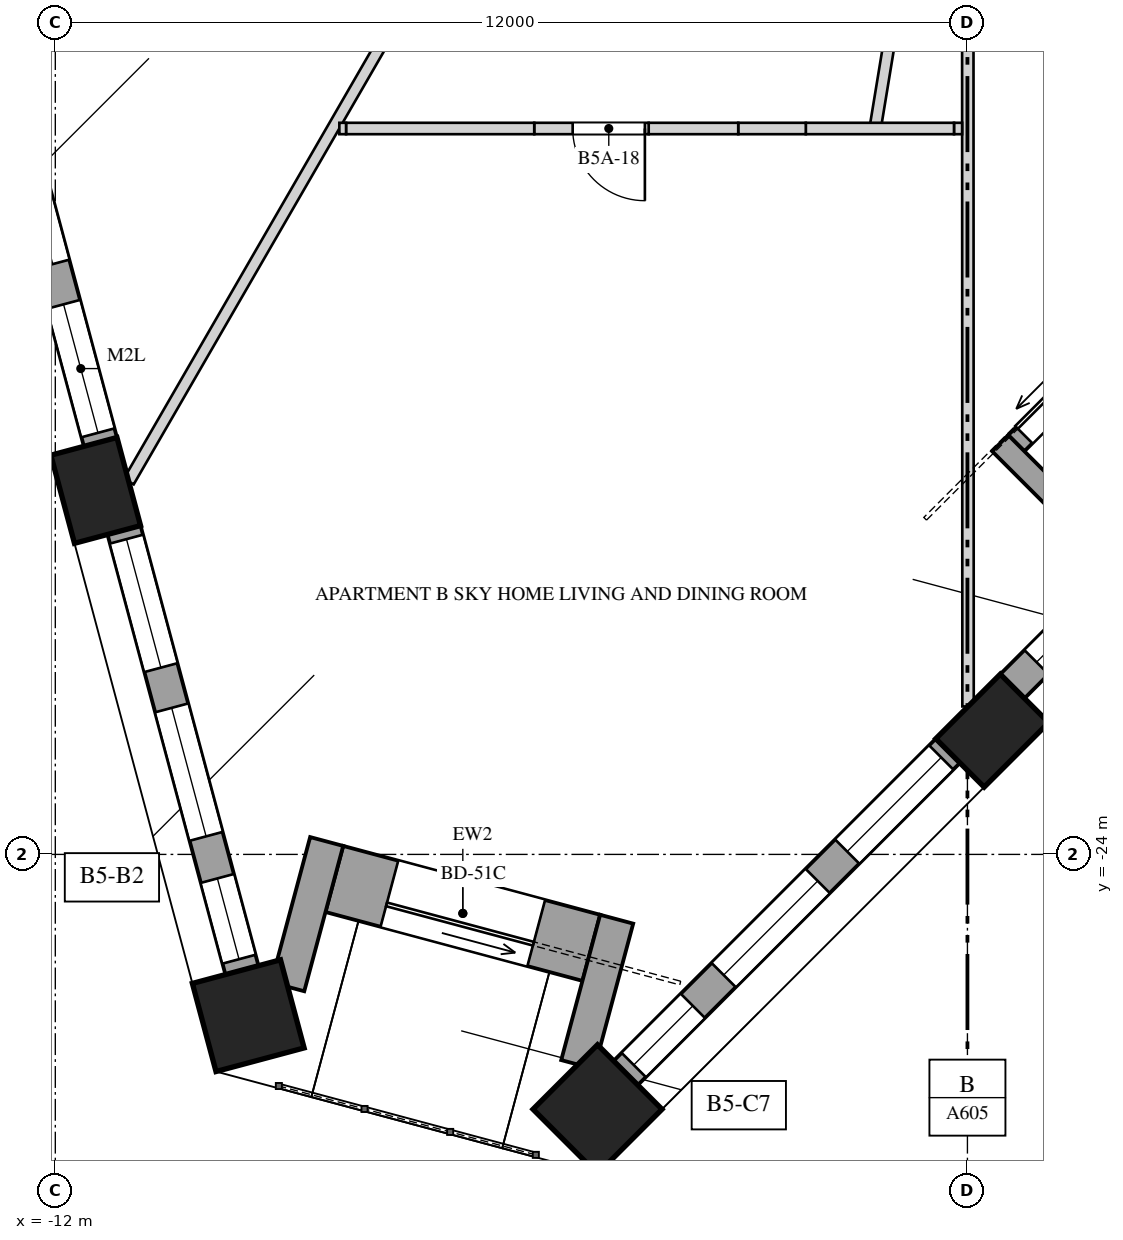
"""IFC4 building model, lengths in metres.
Left out: names, types, materials, properties, quantities, classifications, styles, units other than length and angle.
Written with IfcOpenShell. Run it as: python <this file> out.ifc"""

import sys

from ifc_helpers import new_model, si_unit, direction, frame, frame_2d, origin, origin_2d, place, context, subcontext, project, spatial, polyline, rectangle, outline, extrude, element, fill, save


model = new_model("IFC4")
c1 = context("Model", 3, precision=1e-05, world=origin(), true_north=direction((0.0, 1.0)))
c2 = subcontext(c1, "Body", "Model", "MODEL_VIEW")
j1 = project(units=[si_unit("LENGTHUNIT", "METRE"), si_unit("PLANEANGLEUNIT", "RADIAN")], contexts=[c1])
p1 = place(None, origin())
s1 = spatial("IfcSite", under=j1, at=p1, CompositionType="ELEMENT")
p2 = place(p1, origin())
s2 = spatial("IfcBuilding", under=s1, at=p2, CompositionType="ELEMENT")
p3 = place(p2, frame((0.0, 0.0, 200.0)))
s3 = spatial("IfcBuildingStorey", under=s2, at=p3, CompositionType="ELEMENT", Elevation=200.0)
p4 = place(p3, frame((-11.469, -19.211, -0.35), z_axis=(0.0, 0.0, 1.0), x_axis=(0.258819045103, -0.965925826289, 0.0)))
e1 = element("IfcColumn", 1, at=p4, inside=s3, PredefinedType="COLUMN", context=c2, shape_type="SweptSolid", body=[
    extrude(rectangle(XDim=1.2, YDim=0.9, at=origin_2d()), origin(), (0.0, 0.0, 1.0), 4.35),
])
for number, where, z_axis, x_axis in (
    (2, (-9.462, -26.122, -0.35), (0.0, 0.0, 1.0), (0.259, -0.966, 0.0)),
    (3, (-4.867, -27.353, -0.35), (0.0, 0.0, 1.0), (0.707, 0.707, 0.0)),
):
    element("IfcColumn", number, at=place(p3, frame(where, z_axis=z_axis, x_axis=x_axis)), inside=s3, PredefinedType="COLUMN", context=c2, shape_type="SweptSolid", body=[
        extrude(rectangle(XDim=1.2, YDim=1.2, at=origin_2d()), origin(), (0.0, 0.0, 1.0), 4.35),
    ])
p5 = place(p3, frame((0.326, -22.372, -0.35), z_axis=(0.0, 0.0, 1.0), x_axis=(0.707106781187, 0.707106781187, 0.0)))
e4 = element("IfcColumn", 4, at=p5, inside=s3, PredefinedType="COLUMN", context=c2, shape_type="SweptSolid", body=[
    extrude(rectangle(XDim=1.2, YDim=0.9, at=origin_2d()), origin(), (0.0, 0.0, 1.0), 4.35),
])
p6 = place(p3, frame((-13.113, -12.204, 0.0), z_axis=(0.0, 0.0, 1.0), x_axis=(0.258835402268, -0.965921443251, 0.0)))
e5 = element("IfcWall", 5, at=p6, inside=s3, PredefinedType="SOLIDWALL", context=c2, shape_type="SweptSolid", body=[
    extrude(rectangle(XDim=6.594, YDim=0.45, at=frame_2d((3.297, 0.0))), origin(), (0.0, 0.0, 1.0), 3.3),
])
p7 = place(p6, frame((0.124, 0.0, 0.5)))
e6 = element("IfcOpeningElement", 6, at=p7, cuts=e5, PredefinedType="OPENING", context=c2, shape_type="SweptSolid", body=[
    extrude(rectangle(XDim=1.75, YDim=2.65, at=frame_2d((0.875, 1.325))), frame((0.0, 0.235, 0.0), z_axis=(0.0, -1.0, 0.0), x_axis=(1.0, 0.0, 0.0)), (0.0, 0.0, 1.0), 0.47),
])
p8 = place(p6, frame((2.422, 0.0, 0.5)))
e7 = element("IfcOpeningElement", 7, at=p8, cuts=e5, PredefinedType="OPENING", context=c2, shape_type="SweptSolid", body=[
    extrude(rectangle(XDim=1.75, YDim=2.65, at=frame_2d((0.875, 1.325))), frame((0.0, 0.235, 0.0), z_axis=(0.0, -1.0, 0.0), x_axis=(1.0, 0.0, 0.0)), (0.0, 0.0, 1.0), 0.47),
])
p9 = place(p6, frame((4.72, 0.0, 0.5)))
e8 = element("IfcOpeningElement", 8, at=p9, cuts=e5, PredefinedType="OPENING", context=c2, shape_type="SweptSolid", body=[
    extrude(rectangle(XDim=1.75, YDim=2.0, at=frame_2d((0.875, 1.0))), frame((0.0, 0.235, 0.0), z_axis=(0.0, -1.0, 0.0), x_axis=(1.0, 0.0, 0.0)), (0.0, 0.0, 1.0), 0.47),
])
p10 = place(p3, frame((-11.096, -19.733, 0.0), z_axis=(0.0, 0.0, 1.0), x_axis=(0.258831089404, -0.965922598948, 0.0)))
e9 = element("IfcWall", 9, at=p10, inside=s3, PredefinedType="SOLIDWALL", context=c2, shape_type="SweptSolid", body=[
    extrude(rectangle(XDim=5.994, YDim=0.45, at=frame_2d((2.997, 0.0))), origin(), (0.0, 0.0, 1.0), 3.3),
])
p11 = place(p10, frame((0.124, 0.0, 0.5)))
e10 = element("IfcOpeningElement", 10, at=p11, cuts=e9, PredefinedType="OPENING", context=c2, shape_type="SweptSolid", body=[
    extrude(rectangle(XDim=1.75, YDim=2.65, at=frame_2d((0.875, 1.325))), frame((0.0, 0.235, 0.0), z_axis=(0.0, -1.0, 0.0), x_axis=(1.0, 0.0, 0.0)), (0.0, 0.0, 1.0), 0.47),
])
p12 = place(p10, frame((2.422, 0.0, 0.5)))
e11 = element("IfcOpeningElement", 11, at=p12, cuts=e9, PredefinedType="OPENING", context=c2, shape_type="SweptSolid", body=[
    extrude(rectangle(XDim=1.75, YDim=2.65, at=frame_2d((0.875, 1.325))), frame((0.0, 0.235, 0.0), z_axis=(0.0, -1.0, 0.0), x_axis=(1.0, 0.0, 0.0)), (0.0, 0.0, 1.0), 0.47),
])
p13 = place(p10, frame((4.745, 0.0, 0.5)))
e12 = element("IfcOpeningElement", 12, at=p13, cuts=e9, PredefinedType="OPENING", context=c2, shape_type="SweptSolid", body=[
    extrude(rectangle(XDim=1.1, YDim=2.0, at=frame_2d((0.55, 1.0))), frame((0.0, 0.235, 0.0), z_axis=(0.0, -1.0, 0.0), x_axis=(1.0, 0.0, 0.0)), (0.0, 0.0, 1.0), 0.47),
])
p14 = place(p3, frame((-4.496, -26.875, 0.0), z_axis=(0.0, 0.0, 1.0), x_axis=(0.707106781187, 0.707106781187, 0.0)))
e13 = element("IfcWall", 13, at=p14, inside=s3, PredefinedType="SOLIDWALL", context=c2, shape_type="SweptSolid", body=[
    extrude(rectangle(XDim=5.994, YDim=0.45, at=frame_2d((2.997, 0.0))), origin(), (0.0, 0.0, 1.0), 3.3),
])
p15 = place(p14, frame((0.149, 0.0, 0.5)))
e14 = element("IfcOpeningElement", 14, at=p15, cuts=e13, PredefinedType="OPENING", context=c2, shape_type="SweptSolid", body=[
    extrude(rectangle(XDim=1.1, YDim=2.0, at=frame_2d((0.55, 1.0))), frame((0.0, 0.235, 0.0), z_axis=(0.0, -1.0, 0.0), x_axis=(1.0, 0.0, 0.0)), (0.0, 0.0, 1.0), 0.47),
])
p16 = place(p14, frame((1.822, 0.0, 0.5)))
e15 = element("IfcOpeningElement", 15, at=p16, cuts=e13, PredefinedType="OPENING", context=c2, shape_type="SweptSolid", body=[
    extrude(rectangle(XDim=1.75, YDim=2.65, at=frame_2d((0.875, 1.325))), frame((0.0, 0.235, 0.0), z_axis=(0.0, -1.0, 0.0), x_axis=(1.0, 0.0, 0.0)), (0.0, 0.0, 1.0), 0.47),
])
p17 = place(p14, frame((4.12, 0.0, 0.5)))
e16 = element("IfcOpeningElement", 16, at=p17, cuts=e13, PredefinedType="OPENING", context=c2, shape_type="SweptSolid", body=[
    extrude(rectangle(XDim=1.75, YDim=2.65, at=frame_2d((0.875, 1.325))), frame((0.0, 0.235, 0.0), z_axis=(0.0, -1.0, 0.0), x_axis=(1.0, 0.0, 0.0)), (0.0, 0.0, 1.0), 0.47),
])
p18 = place(p3, frame((0.592, -21.788, 0.0), z_axis=(0.0, 0.0, 1.0), x_axis=(0.707106781187, 0.707106781187, 0.0)))
e17 = element("IfcWall", 17, at=p18, inside=s3, PredefinedType="SOLIDWALL", context=c2, shape_type="SweptSolid", body=[
    extrude(rectangle(XDim=1.998, YDim=0.45, at=frame_2d((0.999, 0.0))), origin(), (0.0, 0.0, 1.0), 3.3),
])
p19 = place(p18, frame((0.449, 0.0, 0.5)))
e18 = element("IfcOpeningElement", 18, at=p19, cuts=e17, PredefinedType="OPENING", context=c2, shape_type="SweptSolid", body=[
    extrude(rectangle(XDim=1.1, YDim=2.65, at=frame_2d((0.55, 1.325))), frame((0.0, 0.235, 0.0), z_axis=(0.0, -1.0, 0.0), x_axis=(1.0, 0.0, 0.0)), (0.0, 0.0, 1.0), 0.47),
])
p20 = place(p3, frame((0.643, -18.59, 0.0), z_axis=(0.0, 0.0, 1.0), x_axis=(0.707106781187, 0.707106781187, 0.0)))
e19 = element("IfcWall", 19, at=p20, inside=s3, PredefinedType="SOLIDWALL", context=c2, shape_type="SweptSolid", body=[
    extrude(rectangle(XDim=1.998, YDim=0.3, at=frame_2d((0.999, 0.0))), origin(), (0.0, 0.0, 1.0), 3.3),
])
p21 = place(p20, frame((0.149, 0.0, 0.0)))
e20 = element("IfcOpeningElement", 20, at=p21, cuts=e19, PredefinedType="OPENING", context=c2, shape_type="SweptSolid", body=[
    extrude(rectangle(XDim=1.7, YDim=2.45, at=frame_2d((0.85, 1.225))), frame((0.0, 0.16, 0.0), z_axis=(0.0, -1.0, 0.0), x_axis=(1.0, 0.0, 0.0)), (0.0, 0.0, 1.0), 0.32),
])
p22 = place(p3, frame((2.588, -20.747, 0.0), z_axis=(0.0, 0.0, 1.0), x_axis=(-0.707066755897, 0.707146804211, 0.0)))
e21 = element("IfcWall", 21, at=p22, inside=s3, PredefinedType="SOLIDWALL", context=c2, shape_type="SweptSolid", body=[
    extrude(rectangle(XDim=3.05, YDim=0.3, at=frame_2d((1.525, 0.0))), origin(), (0.0, 0.0, 1.0), 3.3),
])
p23 = place(p3, frame((-4.948, -25.229, 0.0), z_axis=(0.0, 0.0, 1.0), x_axis=(-0.965918160473, 0.258847652622, 0.0)))
e22 = element("IfcWall", 22, at=p23, inside=s3, PredefinedType="SOLIDWALL", context=c2, shape_type="SweptSolid", body=[
    extrude(rectangle(XDim=3.5, YDim=0.9, at=frame_2d((1.75, 0.0))), origin(), (0.0, 0.0, 1.0), 3.3),
])
p24 = place(p23, frame((0.75, 0.0, 0.0)))
e23 = element("IfcOpeningElement", 23, at=p24, cuts=e22, PredefinedType="OPENING", context=c2, shape_type="SweptSolid", body=[
    extrude(rectangle(XDim=2.0, YDim=2.4, at=frame_2d((1.0, 1.2))), frame((0.0, 0.46, 0.0), z_axis=(0.0, -1.0, 0.0), x_axis=(1.0, 0.0, 0.0)), (0.0, 0.0, 1.0), 0.92),
])
p25 = place(p3, frame((-5.127, -26.764, 0.0), z_axis=(0.0, 0.0, 1.0), x_axis=(0.258814190615, 0.965927127032, 0.0)))
e24 = element("IfcWall", 24, at=p25, inside=s3, PredefinedType="SOLIDWALL", context=c2, shape_type="SweptSolid", body=[
    extrude(rectangle(XDim=1.979, YDim=0.45, at=frame_2d((0.99, 0.0))), origin(), (0.0, 0.0, 1.0), 2.55),
])
p26 = place(p3, frame((-8.942, -25.742, 0.0), z_axis=(0.0, 0.0, 1.0), x_axis=(0.258783354109, 0.965935388955, 0.0)))
e25 = element("IfcWall", 25, at=p26, inside=s3, PredefinedType="SOLIDWALL", context=c2, shape_type="SweptSolid", body=[
    extrude(rectangle(XDim=1.979, YDim=0.45, at=frame_2d((0.99, 0.0))), origin(), (0.0, 0.0, 1.0), 2.55),
])
p27 = place(p3, frame((-11.034, -19.095, 0.0), z_axis=(0.0, 0.0, 1.0), x_axis=(0.500337694151, 0.86583034817, 0.0)))
e26 = element("IfcWall", 26, at=p27, inside=s3, PredefinedType="PARTITIONING", context=c2, shape_type="SweptSolid", body=[
    extrude(rectangle(XDim=9.205, YDim=0.15, at=frame_2d((4.603, 0.0))), origin(), (0.0, 0.0, 1.0), 2.75),
])
p28 = place(p3, frame((-0.655, -11.052, 0.0), z_axis=(0.0, 0.0, 1.0), x_axis=(-0.162305002106, -0.986740637803, 0.0)))
e27 = element("IfcWall", 27, at=p28, inside=s3, PredefinedType="PARTITIONING", context=c2, shape_type="SweptSolid", body=[
    extrude(rectangle(XDim=3.442, YDim=0.15, at=frame_2d((1.721, 0.0))), origin(), (0.0, 0.0, 1.0), 3.65),
])
p29 = place(p28, frame((1.296, 0.0, 0.0)))
e28 = element("IfcOpeningElement", 28, at=p29, cuts=e27, PredefinedType="OPENING", context=c2, shape_type="SweptSolid", body=[
    extrude(rectangle(XDim=0.85, YDim=2.4, at=frame_2d((0.425, 1.2))), frame((0.0, 0.085, 0.0), z_axis=(0.0, -1.0, 0.0), x_axis=(1.0, 0.0, 0.0)), (0.0, 0.0, 1.0), 0.17),
])
p30 = place(p3, frame((0.004, -11.125, 0.0), z_axis=(0.0, 0.0, 1.0), x_axis=(0.00035743804, -0.999999936119, 0.0)))
e29 = element("IfcWall", 29, at=p30, inside=s3, PredefinedType="PARTITIONING", context=c2, shape_type="SweptSolid", body=[
    extrude(rectangle(XDim=10.928, YDim=0.15, at=frame_2d((5.464, 0.0))), origin(), (0.0, 0.0, 1.0), 2.75),
])
p31 = place(p3, frame((-0.07, -14.45, 0.0), z_axis=(0.0, 0.0, 1.0), x_axis=(-1.0, 0.0, 0.0)))
e30 = element("IfcWall", 30, at=p31, inside=s3, PredefinedType="PARTITIONING", context=c2, shape_type="SweptSolid", body=[
    extrude(rectangle(XDim=0.107, YDim=0.15, at=frame_2d((0.054, 0.0))), origin(), (0.0, 0.0, 1.0), 2.75),
])
p32 = place(p3, frame((-0.177, -14.45, 0.0), z_axis=(0.0, 0.0, 1.0), x_axis=(-1.0, 0.0, 0.0)))
e31 = element("IfcWall", 31, at=p32, inside=s3, PredefinedType="PARTITIONING", context=c2, shape_type="SweptSolid", body=[
    extrude(rectangle(XDim=1.95, YDim=0.15, at=frame_2d((0.975, 0.0))), origin(), (0.0, 0.0, 1.0), 3.65),
])
p33 = place(p3, frame((-2.127, -14.45, 0.0), z_axis=(0.0, 0.0, 1.0), x_axis=(-1.0, 0.0, 0.0)))
e32 = element("IfcWall", 32, at=p33, inside=s3, PredefinedType="PARTITIONING", context=c2, shape_type="SweptSolid", body=[
    extrude(rectangle(XDim=0.889, YDim=0.15, at=frame_2d((0.444, 0.0))), origin(), (0.0, 0.0, 1.0), 2.55),
])
p34 = place(p3, frame((-3.015, -14.45, 0.0), z_axis=(0.0, 0.0, 1.0), x_axis=(-1.0, 0.0, 0.0)))
e33 = element("IfcWall", 33, at=p34, inside=s3, PredefinedType="PARTITIONING", context=c2, shape_type="SweptSolid", body=[
    extrude(rectangle(XDim=1.178, YDim=0.15, at=frame_2d((0.589, 0.0))), origin(), (0.0, 0.0, 1.0), 3.65),
])
p35 = place(p3, frame((-4.193, -14.45, 0.0), z_axis=(0.0, 0.0, 1.0), x_axis=(-1.0, 0.0, 0.0)))
e34 = element("IfcWall", 34, at=p35, inside=s3, PredefinedType="PARTITIONING", context=c2, shape_type="SweptSolid", body=[
    extrude(outline(polyline([(0.0, 0.0), (1.506, 0.0), (1.506, 2.55), (0.575, 2.55), (0.575, 3.65), (0.0, 3.65), (0.0, 0.0)])), frame((0.0, 0.075, 0.0), z_axis=(0.0, -1.0, 0.0), x_axis=(1.0, 0.0, 0.0)), (0.0, 0.0, 1.0), 0.15),
])
p36 = place(p35, frame((0.05, 0.0, 0.0)))
e35 = element("IfcOpeningElement", 35, at=p36, cuts=e34, PredefinedType="OPENING", context=c2, shape_type="SweptSolid", body=[
    extrude(rectangle(XDim=0.95, YDim=2.4, at=frame_2d((0.475, 1.2))), frame((0.0, 0.085, 0.0), z_axis=(0.0, -1.0, 0.0), x_axis=(1.0, 0.0, 0.0)), (0.0, 0.0, 1.0), 0.17),
])
p37 = place(p3, frame((-5.699, -14.45, 0.0), z_axis=(0.0, 0.0, 1.0), x_axis=(-1.0, 0.0, 0.0)))
e36 = element("IfcWall", 36, at=p37, inside=s3, PredefinedType="PARTITIONING", context=c2, shape_type="SweptSolid", body=[
    extrude(rectangle(XDim=2.476, YDim=0.15, at=frame_2d((1.238, 0.0))), origin(), (0.0, 0.0, 1.0), 3.65),
])
p38 = place(p3, frame((-8.175, -14.45, 0.0), z_axis=(0.0, 0.0, 1.0), x_axis=(-1.0, 0.0, 0.0)))
e37 = element("IfcWall", 37, at=p38, inside=s3, PredefinedType="PARTITIONING", context=c2, shape_type="SweptSolid", body=[
    extrude(rectangle(XDim=0.088, YDim=0.15, at=frame_2d((0.044, 0.0))), origin(), (0.0, 0.0, 1.0), 2.75),
])
p39 = place(p8, origin())
e38 = element("IfcWindow", 38, at=p39, inside=s3, PartitioningType="SINGLE_PANEL", PredefinedType="WINDOW", context=c2, shape_type="SweptSolid", body=[
    extrude(rectangle(XDim=1.75, YDim=2.65, at=frame_2d((0.875, 1.325))), frame((0.0, 0.03, 0.0), z_axis=(0.0, -1.0, 0.0), x_axis=(1.0, 0.0, 0.0)), (0.0, 0.0, 1.0), 0.06),
])
fill(e7, e38)
p40 = place(p9, origin())
e39 = element("IfcWindow", 39, at=p40, inside=s3, PartitioningType="SINGLE_PANEL", PredefinedType="WINDOW", context=c2, shape_type="SweptSolid", body=[
    extrude(rectangle(XDim=1.75, YDim=2.0, at=frame_2d((0.875, 1.0))), frame((0.0, 0.03, 0.0), z_axis=(0.0, -1.0, 0.0), x_axis=(1.0, 0.0, 0.0)), (0.0, 0.0, 1.0), 0.06),
])
fill(e8, e39)
p41 = place(p11, origin())
e40 = element("IfcWindow", 40, at=p41, inside=s3, PartitioningType="SINGLE_PANEL", PredefinedType="WINDOW", context=c2, shape_type="SweptSolid", body=[
    extrude(rectangle(XDim=1.75, YDim=2.65, at=frame_2d((0.875, 1.325))), frame((0.0, 0.03, 0.0), z_axis=(0.0, -1.0, 0.0), x_axis=(1.0, 0.0, 0.0)), (0.0, 0.0, 1.0), 0.06),
])
fill(e10, e40)
p42 = place(p12, origin())
e41 = element("IfcWindow", 41, at=p42, inside=s3, PartitioningType="SINGLE_PANEL", PredefinedType="WINDOW", context=c2, shape_type="SweptSolid", body=[
    extrude(rectangle(XDim=1.75, YDim=2.65, at=frame_2d((0.875, 1.325))), frame((0.0, 0.03, 0.0), z_axis=(0.0, -1.0, 0.0), x_axis=(1.0, 0.0, 0.0)), (0.0, 0.0, 1.0), 0.06),
])
fill(e11, e41)
p43 = place(p13, origin())
e42 = element("IfcWindow", 42, at=p43, inside=s3, PartitioningType="SINGLE_PANEL", PredefinedType="WINDOW", context=c2, shape_type="SweptSolid", body=[
    extrude(rectangle(XDim=1.1, YDim=2.0, at=frame_2d((0.55, 1.0))), frame((0.0, 0.03, 0.0), z_axis=(0.0, -1.0, 0.0), x_axis=(1.0, 0.0, 0.0)), (0.0, 0.0, 1.0), 0.06),
])
fill(e12, e42)
p44 = place(p15, origin())
e43 = element("IfcWindow", 43, at=p44, inside=s3, PartitioningType="SINGLE_PANEL", PredefinedType="WINDOW", context=c2, shape_type="SweptSolid", body=[
    extrude(rectangle(XDim=1.1, YDim=2.0, at=frame_2d((0.55, 1.0))), frame((0.0, 0.03, 0.0), z_axis=(0.0, -1.0, 0.0), x_axis=(1.0, 0.0, 0.0)), (0.0, 0.0, 1.0), 0.06),
])
fill(e14, e43)
p45 = place(p16, origin())
e44 = element("IfcWindow", 44, at=p45, inside=s3, PartitioningType="SINGLE_PANEL", PredefinedType="WINDOW", context=c2, shape_type="SweptSolid", body=[
    extrude(rectangle(XDim=1.75, YDim=2.65, at=frame_2d((0.875, 1.325))), frame((0.0, 0.03, 0.0), z_axis=(0.0, -1.0, 0.0), x_axis=(1.0, 0.0, 0.0)), (0.0, 0.0, 1.0), 0.06),
])
fill(e15, e44)
p46 = place(p17, origin())
e45 = element("IfcWindow", 45, at=p46, inside=s3, PartitioningType="SINGLE_PANEL", PredefinedType="WINDOW", context=c2, shape_type="SweptSolid", body=[
    extrude(rectangle(XDim=1.75, YDim=2.65, at=frame_2d((0.875, 1.325))), frame((0.0, 0.03, 0.0), z_axis=(0.0, -1.0, 0.0), x_axis=(1.0, 0.0, 0.0)), (0.0, 0.0, 1.0), 0.06),
])
fill(e16, e45)
p47 = place(p19, origin())
e46 = element("IfcWindow", 46, at=p47, inside=s3, PartitioningType="SINGLE_PANEL", PredefinedType="WINDOW", context=c2, shape_type="SweptSolid", body=[
    extrude(rectangle(XDim=1.1, YDim=2.65, at=frame_2d((0.55, 1.325))), frame((0.0, 0.03, 0.0), z_axis=(0.0, -1.0, 0.0), x_axis=(1.0, 0.0, 0.0)), (0.0, 0.0, 1.0), 0.06),
])
fill(e18, e46)
p48 = place(p21, origin())
e47 = element("IfcDoor", 47, at=p48, inside=s3, OperationType="SLIDING_TO_LEFT", PredefinedType="DOOR", context=c2, shape_type="SweptSolid", body=[
    extrude(rectangle(XDim=1.7, YDim=2.45, at=frame_2d((0.85, 1.225))), frame((0.0, 0.025, 0.0), z_axis=(0.0, -1.0, 0.0), x_axis=(1.0, 0.0, 0.0)), (0.0, 0.0, 1.0), 0.05),
])
fill(e20, e47)
p49 = place(p24, origin())
e48 = element("IfcDoor", 48, at=p49, inside=s3, OperationType="SLIDING_TO_LEFT", PredefinedType="DOOR", context=c2, shape_type="SweptSolid", body=[
    extrude(rectangle(XDim=2.0, YDim=2.4, at=frame_2d((1.0, 1.2))), frame((0.0, 0.025, 0.0), z_axis=(0.0, -1.0, 0.0), x_axis=(1.0, 0.0, 0.0)), (0.0, 0.0, 1.0), 0.05),
])
fill(e23, e48)
p50 = place(p36, origin())
e49 = element("IfcDoor", 49, at=p50, inside=s3, OperationType="SINGLE_SWING_RIGHT", PredefinedType="DOOR", context=c2, shape_type="SweptSolid", body=[
    extrude(rectangle(XDim=0.95, YDim=2.4, at=frame_2d((0.475, 1.2))), frame((0.0, 0.025, 0.0), z_axis=(0.0, -1.0, 0.0), x_axis=(1.0, 0.0, 0.0)), (0.0, 0.0, 1.0), 0.05),
])
fill(e35, e49)
save(model, sys.argv[1])
